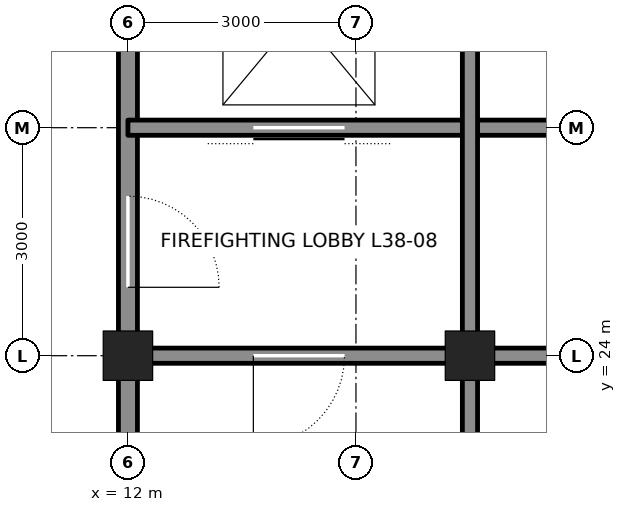
"""IFC4 building model, lengths in metres.
Left out: names, types, materials, properties, quantities, classifications, styles, units other than length and angle.
Written with IfcOpenShell. Run it as: python <this file> out.ifc"""

import sys

from ifc_helpers import new_model, si_unit, direction, frame, frame_2d, origin, origin_2d, place, context, subcontext, project, spatial, rectangle, hollow_rectangle, extrude, element, fill, save


model = new_model("IFC4")
c1 = context("Model", 3, precision=1e-05, world=origin(), true_north=direction((0.0, 1.0)))
c2 = subcontext(c1, "Body", "Model", "MODEL_VIEW")
j1 = project(units=[si_unit("LENGTHUNIT", "METRE"), si_unit("PLANEANGLEUNIT", "RADIAN")], contexts=[c1])
p1 = place(None, origin())
s1 = spatial("IfcSite", under=j1, at=p1, CompositionType="ELEMENT")
p2 = place(p1, origin())
s2 = spatial("IfcBuilding", under=s1, at=p2, CompositionType="ELEMENT")
p3 = place(p2, frame((0.0, 0.0, 174.0)))
s3 = spatial("IfcBuildingStorey", under=s2, at=p3, CompositionType="ELEMENT", Elevation=174.0)
for number, where, z_axis, x_axis in (
    (1, (12.0, 24.0, 0.0), (0.0, 0.0, 1.0), (1.0, 0.0, 0.0)),
    (2, (16.5, 24.0, 0.0), (0.0, 0.0, 1.0), (1.0, 0.0, 0.0)),
):
    element("IfcColumn", number, at=place(p3, frame(where, z_axis=z_axis, x_axis=x_axis)), inside=s3, PredefinedType="COLUMN", context=c2, shape_type="SweptSolid", body=[
        extrude(hollow_rectangle(XDim=0.65, YDim=0.65, WallThickness=0.065, at=origin_2d()), origin(), (0.0, 0.0, 1.0), 6.0),
    ])
p4 = place(p3, frame((12.0, 21.25, 0.0), z_axis=(0.0, 0.0, 1.0), x_axis=(0.0, 1.0, 0.0)))
e3 = element("IfcWall", 3, at=p4, inside=s3, PredefinedType="SOLIDWALL", context=c2, shape_type="SweptSolid", body=[
    extrude(rectangle(XDim=2.5, YDim=0.25, at=frame_2d((1.25, 0.0))), origin(), (0.0, 0.0, 1.0), 4.913),
])
p5 = place(p3, frame((12.0, 24.25, 0.0), z_axis=(0.0, 0.0, 1.0), x_axis=(0.0, 1.0, 0.0)))
e4 = element("IfcWall", 4, at=p5, inside=s3, PredefinedType="SOLIDWALL", context=c2, shape_type="SweptSolid", body=[
    extrude(rectangle(XDim=8.5, YDim=0.25, at=frame_2d((4.25, 0.0))), origin(), (0.0, 0.0, 1.0), 4.913),
])
p6 = place(p5, frame((0.65, 0.0, 0.0)))
e5 = element("IfcOpeningElement", 5, at=p6, cuts=e4, PredefinedType="OPENING", context=c2, shape_type="SweptSolid", body=[
    extrude(rectangle(XDim=1.2, YDim=2.1, at=frame_2d((0.6, 1.05))), frame((0.0, 0.135, 0.0), z_axis=(0.0, -1.0, 0.0), x_axis=(1.0, 0.0, 0.0)), (0.0, 0.0, 1.0), 0.27),
])
p7 = place(p5, frame((6.875, 0.0, 0.0)))
e6 = element("IfcOpeningElement", 6, at=p7, cuts=e4, PredefinedType="OPENING", context=c2, shape_type="SweptSolid", body=[
    extrude(rectangle(XDim=0.75, YDim=2.1, at=frame_2d((0.375, 1.05))), frame((0.0, 0.135, 0.0), z_axis=(0.0, -1.0, 0.0), x_axis=(1.0, 0.0, 0.0)), (0.0, 0.0, 1.0), 0.27),
])
p8 = place(p3, frame((12.25, 24.0, 0.0), z_axis=(0.0, 0.0, 1.0), x_axis=(1.0, 0.0, 0.0)))
e7 = element("IfcWall", 7, at=p8, inside=s3, PredefinedType="SOLIDWALL", context=c2, shape_type="SweptSolid", body=[
    extrude(rectangle(XDim=4.0, YDim=0.2, at=frame_2d((2.0, 0.0))), origin(), (0.0, 0.0, 1.0), 4.89),
])
p9 = place(p8, frame((1.4, 0.0, 0.0)))
e8 = element("IfcOpeningElement", 8, at=p9, cuts=e7, PredefinedType="OPENING", context=c2, shape_type="SweptSolid", body=[
    extrude(rectangle(XDim=1.2, YDim=2.1, at=frame_2d((0.6, 1.05))), frame((0.0, 0.11, 0.0), z_axis=(0.0, -1.0, 0.0), x_axis=(1.0, 0.0, 0.0)), (0.0, 0.0, 1.0), 0.22),
])
p10 = place(p3, frame((16.75, 24.0, 0.0), z_axis=(0.0, 0.0, 1.0), x_axis=(1.0, 0.0, 0.0)))
e9 = element("IfcWall", 9, at=p10, inside=s3, PredefinedType="SOLIDWALL", context=c2, shape_type="SweptSolid", body=[
    extrude(rectangle(XDim=2.75, YDim=0.2, at=frame_2d((1.375, 0.0))), origin(), (0.0, 0.0, 1.0), 4.89),
])
p11 = place(p3, frame((12.0, 27.0, 0.0), z_axis=(0.0, 0.0, 1.0), x_axis=(1.0, 0.0, 0.0)))
e10 = element("IfcWall", 10, at=p11, inside=s3, PredefinedType="SOLIDWALL", context=c2, shape_type="SweptSolid", body=[
    extrude(rectangle(XDim=7.5, YDim=0.2, at=frame_2d((3.75, 0.0))), origin(), (0.0, 0.0, 1.0), 5.84),
])
p12 = place(p11, frame((1.65, 0.0, 0.0)))
e11 = element("IfcOpeningElement", 11, at=p12, cuts=e10, PredefinedType="OPENING", context=c2, shape_type="SweptSolid", body=[
    extrude(rectangle(XDim=1.2, YDim=2.1, at=frame_2d((0.6, 1.05))), frame((0.0, 0.11, 0.0), z_axis=(0.0, -1.0, 0.0), x_axis=(1.0, 0.0, 0.0)), (0.0, 0.0, 1.0), 0.22),
])
p13 = place(p3, frame((16.5, 21.25, 0.0), z_axis=(0.0, 0.0, 1.0), x_axis=(0.0, 1.0, 0.0)))
e12 = element("IfcWall", 12, at=p13, inside=s3, PredefinedType="SOLIDWALL", context=c2, shape_type="SweptSolid", body=[
    extrude(rectangle(XDim=2.5, YDim=0.2, at=frame_2d((1.25, 0.0))), origin(), (0.0, 0.0, 1.0), 4.913),
])
p14 = place(p3, frame((16.5, 24.25, 0.0), z_axis=(0.0, 0.0, 1.0), x_axis=(0.0, 1.0, 0.0)))
e13 = element("IfcWall", 13, at=p14, inside=s3, PredefinedType="SOLIDWALL", context=c2, shape_type="SweptSolid", body=[
    extrude(rectangle(XDim=8.5, YDim=0.2, at=frame_2d((4.25, 0.0))), origin(), (0.0, 0.0, 1.0), 4.913),
])
p15 = place(p9, frame((1.2, 0.0, 0.0), z_axis=(0.0, 0.0, 1.0), x_axis=(-1.0, 0.0, 0.0)))
e14 = element("IfcDoor", 14, at=p15, inside=s3, OperationType="SINGLE_SWING_RIGHT", PredefinedType="DOOR", context=c2, shape_type="SweptSolid", body=[
    extrude(rectangle(XDim=1.2, YDim=2.1, at=frame_2d((0.6, 1.05))), frame((0.0, 0.025, 0.0), z_axis=(0.0, -1.0, 0.0), x_axis=(1.0, 0.0, 0.0)), (0.0, 0.0, 1.0), 0.05),
])
fill(e8, e14)
p16 = place(p6, frame((1.2, 0.0, 0.0), z_axis=(0.0, 0.0, 1.0), x_axis=(-1.0, 0.0, 0.0)))
e15 = element("IfcDoor", 15, at=p16, inside=s3, OperationType="SINGLE_SWING_RIGHT", PredefinedType="DOOR", context=c2, shape_type="SweptSolid", body=[
    extrude(rectangle(XDim=1.2, YDim=2.1, at=frame_2d((0.6, 1.05))), frame((0.0, 0.025, 0.0), z_axis=(0.0, -1.0, 0.0), x_axis=(1.0, 0.0, 0.0)), (0.0, 0.0, 1.0), 0.05),
])
fill(e5, e15)
p17 = place(p12, origin())
e16 = element("IfcDoor", 16, at=p17, inside=s3, OperationType="DOUBLE_DOOR_SLIDING", PredefinedType="DOOR", context=c2, shape_type="SweptSolid", body=[
    extrude(rectangle(XDim=1.2, YDim=2.1, at=frame_2d((0.6, 1.05))), frame((0.0, 0.025, 0.0), z_axis=(0.0, -1.0, 0.0), x_axis=(1.0, 0.0, 0.0)), (0.0, 0.0, 1.0), 0.05),
])
fill(e11, e16)
save(model, sys.argv[1])
